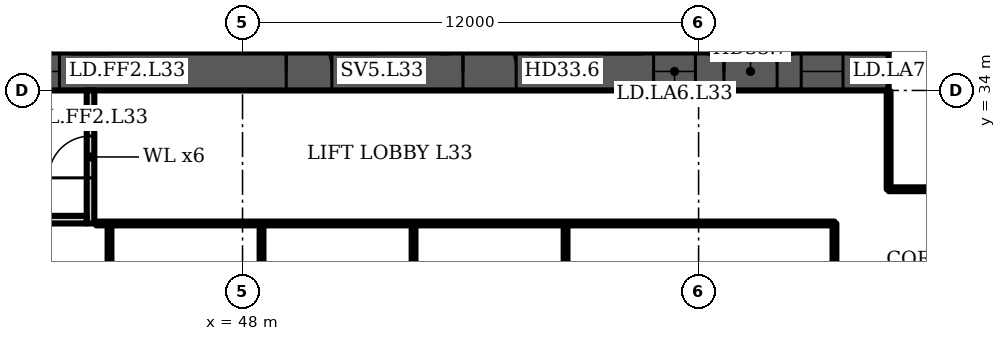
"""IFC4 building model, lengths in metres.
Left out: names, types, materials, properties, quantities, classifications, styles, units other than length and angle.
Written with IfcOpenShell. Run it as: python <this file> out.ifc"""

import sys

from ifc_helpers import new_model, si_unit, direction, frame, frame_2d, origin, place, context, subcontext, project, spatial, rectangle, extrude, element, fill, save


model = new_model("IFC4")
c1 = context("Model", 3, precision=1e-05, world=origin(), true_north=direction((0.0, 1.0)))
c2 = subcontext(c1, "Body", "Model", "MODEL_VIEW")
j1 = project(units=[si_unit("LENGTHUNIT", "METRE"), si_unit("PLANEANGLEUNIT", "RADIAN")], contexts=[c1])
p1 = place(None, origin())
s1 = spatial("IfcSite", under=j1, at=p1, CompositionType="ELEMENT")
p2 = place(p1, origin())
s2 = spatial("IfcBuilding", under=s1, at=p2, CompositionType="ELEMENT")
p3 = place(p2, frame((0.0, 0.0, 139.9)))
s3 = spatial("IfcBuildingStorey", under=s2, at=p3, CompositionType="ELEMENT", Elevation=139.9)
p4 = place(p3, frame((16.0, 34.5, 0.0), z_axis=(0.0, 0.0, 1.0), x_axis=(1.0, 0.0, 0.0)))
e1 = element("IfcWall", 1, at=p4, inside=s3, PredefinedType="SHEAR", context=c2, shape_type="SweptSolid", body=[
    extrude(rectangle(XDim=49.0, YDim=1.0, at=frame_2d((24.5, 0.0))), origin(), (0.0, 0.0, 1.0), 3.6),
])
p5 = place(p4, frame((1.2, 0.0, 0.0)))
e2 = element("IfcOpeningElement", 2, at=p5, cuts=e1, PredefinedType="OPENING", context=c2, shape_type="SweptSolid", body=[
    extrude(rectangle(XDim=1.1, YDim=2.1, at=frame_2d((0.55, 1.05))), frame((0.0, 0.51, 0.0), z_axis=(0.0, -1.0, 0.0), x_axis=(1.0, 0.0, 0.0)), (0.0, 0.0, 1.0), 1.02),
])
p6 = place(p4, frame((5.083, 0.0, 0.0)))
e3 = element("IfcOpeningElement", 3, at=p6, cuts=e1, PredefinedType="OPENING", context=c2, shape_type="SweptSolid", body=[
    extrude(rectangle(XDim=1.1, YDim=2.1, at=frame_2d((0.55, 1.05))), frame((0.0, 0.51, 0.0), z_axis=(0.0, -1.0, 0.0), x_axis=(1.0, 0.0, 0.0)), (0.0, 0.0, 1.0), 1.02),
])
p7 = place(p4, frame((2.933, 0.0, 0.0)))
e4 = element("IfcOpeningElement", 4, at=p7, cuts=e1, PredefinedType="OPENING", context=c2, shape_type="SweptSolid", body=[
    extrude(rectangle(XDim=1.4, YDim=2.1, at=frame_2d((0.7, 1.05))), frame((0.0, 0.51, 0.0), z_axis=(0.0, -1.0, 0.0), x_axis=(1.0, 0.0, 0.0)), (0.0, 0.0, 1.0), 1.02),
])
p8 = place(p4, frame((7.65, 0.0, 0.0)))
e5 = element("IfcOpeningElement", 5, at=p8, cuts=e1, PredefinedType="OPENING", context=c2, shape_type="SweptSolid", body=[
    extrude(rectangle(XDim=1.2, YDim=2.1, at=frame_2d((0.6, 1.05))), frame((0.0, 0.51, 0.0), z_axis=(0.0, -1.0, 0.0), x_axis=(1.0, 0.0, 0.0)), (0.0, 0.0, 1.0), 1.02),
])
p9 = place(p4, frame((14.817, 0.0, 0.0)))
e6 = element("IfcOpeningElement", 6, at=p9, cuts=e1, PredefinedType="OPENING", context=c2, shape_type="SweptSolid", body=[
    extrude(rectangle(XDim=1.1, YDim=2.1, at=frame_2d((0.55, 1.05))), frame((0.0, 0.51, 0.0), z_axis=(0.0, -1.0, 0.0), x_axis=(1.0, 0.0, 0.0)), (0.0, 0.0, 1.0), 1.02),
])
p10 = place(p4, frame((19.083, 0.0, 0.0)))
e7 = element("IfcOpeningElement", 7, at=p10, cuts=e1, PredefinedType="OPENING", context=c2, shape_type="SweptSolid", body=[
    extrude(rectangle(XDim=1.1, YDim=2.1, at=frame_2d((0.55, 1.05))), frame((0.0, 0.51, 0.0), z_axis=(0.0, -1.0, 0.0), x_axis=(1.0, 0.0, 0.0)), (0.0, 0.0, 1.0), 1.02),
])
p11 = place(p4, frame((16.8, 0.0, 0.0)))
e8 = element("IfcOpeningElement", 8, at=p11, cuts=e1, PredefinedType="OPENING", context=c2, shape_type="SweptSolid", body=[
    extrude(rectangle(XDim=1.4, YDim=2.1, at=frame_2d((0.7, 1.05))), frame((0.0, 0.51, 0.0), z_axis=(0.0, -1.0, 0.0), x_axis=(1.0, 0.0, 0.0)), (0.0, 0.0, 1.0), 1.02),
])
p12 = place(p4, frame((21.817, 0.0, 0.0)))
e9 = element("IfcOpeningElement", 9, at=p12, cuts=e1, PredefinedType="OPENING", context=c2, shape_type="SweptSolid", body=[
    extrude(rectangle(XDim=1.1, YDim=2.1, at=frame_2d((0.55, 1.05))), frame((0.0, 0.51, 0.0), z_axis=(0.0, -1.0, 0.0), x_axis=(1.0, 0.0, 0.0)), (0.0, 0.0, 1.0), 1.02),
])
p13 = place(p4, frame((26.083, 0.0, 0.0)))
e10 = element("IfcOpeningElement", 10, at=p13, cuts=e1, PredefinedType="OPENING", context=c2, shape_type="SweptSolid", body=[
    extrude(rectangle(XDim=1.1, YDim=2.1, at=frame_2d((0.55, 1.05))), frame((0.0, 0.51, 0.0), z_axis=(0.0, -1.0, 0.0), x_axis=(1.0, 0.0, 0.0)), (0.0, 0.0, 1.0), 1.02),
])
p14 = place(p4, frame((33.15, 0.0, 0.0)))
e11 = element("IfcOpeningElement", 11, at=p14, cuts=e1, PredefinedType="OPENING", context=c2, shape_type="SweptSolid", body=[
    extrude(rectangle(XDim=1.2, YDim=2.1, at=frame_2d((0.6, 1.05))), frame((0.0, 0.51, 0.0), z_axis=(0.0, -1.0, 0.0), x_axis=(1.0, 0.0, 0.0)), (0.0, 0.0, 1.0), 1.02),
])
p15 = place(p4, frame((37.8, 0.0, 0.0)))
e12 = element("IfcOpeningElement", 12, at=p15, cuts=e1, PredefinedType="OPENING", context=c2, shape_type="SweptSolid", body=[
    extrude(rectangle(XDim=1.4, YDim=2.1, at=frame_2d((0.7, 1.05))), frame((0.0, 0.51, 0.0), z_axis=(0.0, -1.0, 0.0), x_axis=(1.0, 0.0, 0.0)), (0.0, 0.0, 1.0), 1.02),
])
p16 = place(p4, frame((42.817, 0.0, 0.0)))
e13 = element("IfcOpeningElement", 13, at=p16, cuts=e1, PredefinedType="OPENING", context=c2, shape_type="SweptSolid", body=[
    extrude(rectangle(XDim=1.1, YDim=2.1, at=frame_2d((0.55, 1.05))), frame((0.0, 0.51, 0.0), z_axis=(0.0, -1.0, 0.0), x_axis=(1.0, 0.0, 0.0)), (0.0, 0.0, 1.0), 1.02),
])
p17 = place(p4, frame((46.7, 0.0, 0.0)))
e14 = element("IfcOpeningElement", 14, at=p17, cuts=e1, PredefinedType="OPENING", context=c2, shape_type="SweptSolid", body=[
    extrude(rectangle(XDim=1.1, YDim=2.1, at=frame_2d((0.55, 1.05))), frame((0.0, 0.51, 0.0), z_axis=(0.0, -1.0, 0.0), x_axis=(1.0, 0.0, 0.0)), (0.0, 0.0, 1.0), 1.02),
])
p18 = place(p4, frame((44.667, 0.0, 0.0)))
e15 = element("IfcOpeningElement", 15, at=p18, cuts=e1, PredefinedType="OPENING", context=c2, shape_type="SweptSolid", body=[
    extrude(rectangle(XDim=1.4, YDim=2.1, at=frame_2d((0.7, 1.05))), frame((0.0, 0.51, 0.0), z_axis=(0.0, -1.0, 0.0), x_axis=(1.0, 0.0, 0.0)), (0.0, 0.0, 1.0), 1.02),
])
p19 = place(p3, frame((44.0, 30.5, 0.0), z_axis=(0.0, 0.0, 1.0), x_axis=(0.0, 1.0, 0.0)))
e16 = element("IfcWall", 16, at=p19, inside=s3, PredefinedType="PARTITIONING", context=c2, shape_type="SweptSolid", body=[
    extrude(rectangle(XDim=3.5, YDim=0.2, at=frame_2d((1.75, 0.0))), origin(), (0.0, 0.0, 1.0), 3.2),
])
p20 = place(p19, frame((1.2, 0.0, 0.0)))
e17 = element("IfcOpeningElement", 17, at=p20, cuts=e16, PredefinedType="OPENING", context=c2, shape_type="SweptSolid", body=[
    extrude(rectangle(XDim=1.1, YDim=2.1, at=frame_2d((0.55, 1.05))), frame((0.0, 0.11, 0.0), z_axis=(0.0, -1.0, 0.0), x_axis=(1.0, 0.0, 0.0)), (0.0, 0.0, 1.0), 0.22),
])
p21 = place(p3, frame((41.1, 30.6, 0.0), z_axis=(0.0, 0.0, 1.0), x_axis=(1.0, 0.0, 0.0)))
e18 = element("IfcWall", 18, at=p21, inside=s3, PredefinedType="PARTITIONING", context=c2, shape_type="SweptSolid", body=[
    extrude(rectangle(XDim=2.8, YDim=0.2, at=frame_2d((1.4, 0.0))), origin(), (0.0, 0.0, 1.0), 3.2),
])
for number, where, z_axis, x_axis in (
    (19, (44.5, 14.53, 0.0), (0.0, 0.0, 1.0), (0.0, 1.0, 0.0)),
    (20, (48.5, 14.53, 0.0), (0.0, 0.0, 1.0), (0.0, 1.0, 0.0)),
    (21, (52.5, 14.53, 0.0), (0.0, 0.0, 1.0), (0.0, 1.0, 0.0)),
    (22, (56.5, 14.53, 0.0), (0.0, 0.0, 1.0), (0.0, 1.0, 0.0)),
    (23, (63.575, 14.53, 0.0), (0.0, 0.0, 1.0), (0.0, 1.0, 0.0)),
):
    element("IfcWall", number, at=place(p3, frame(where, z_axis=z_axis, x_axis=x_axis)), inside=s3, PredefinedType="PARTITIONING", context=c2, shape_type="SweptSolid", body=[
        extrude(rectangle(XDim=15.97, YDim=0.1, at=frame_2d((7.985, 0.0))), origin(), (0.0, 0.0, 1.0), 3.2),
    ])
p22 = place(p3, frame((65.0, 31.4, 0.0), z_axis=(0.0, 0.0, 1.0), x_axis=(0.0, 1.0, 0.0)))
e24 = element("IfcWall", 24, at=p22, inside=s3, PredefinedType="PARTITIONING", context=c2, shape_type="SweptSolid", body=[
    extrude(rectangle(XDim=2.58, YDim=0.1, at=frame_2d((1.29, 0.0))), origin(), (0.0, 0.0, 1.0), 3.2),
])
p23 = place(p3, frame((65.0, 31.4, 0.0), z_axis=(0.0, 0.0, 1.0), x_axis=(1.0, 0.0, 0.0)))
e25 = element("IfcWall", 25, at=p23, inside=s3, PredefinedType="PARTITIONING", context=c2, shape_type="SweptSolid", body=[
    extrude(rectangle(XDim=4.69, YDim=0.1, at=frame_2d((2.345, 0.0))), origin(), (0.0, 0.0, 1.0), 3.2),
])
p24 = place(p23, frame((1.14, 0.0, 0.0)))
e26 = element("IfcOpeningElement", 26, at=p24, cuts=e25, PredefinedType="OPENING", context=c2, shape_type="SweptSolid", body=[
    extrude(rectangle(XDim=1.8, YDim=2.1, at=frame_2d((0.9, 1.05))), frame((0.0, 0.06, 0.0), z_axis=(0.0, -1.0, 0.0), x_axis=(1.0, 0.0, 0.0)), (0.0, 0.0, 1.0), 0.12),
])
p25 = place(p3, frame((44.15, 30.5, 0.0), z_axis=(0.0, 0.0, 1.0), x_axis=(1.0, 0.0, 0.0)))
e27 = element("IfcWall", 27, at=p25, inside=s3, PredefinedType="PARTITIONING", context=c2, shape_type="SweptSolid", body=[
    extrude(rectangle(XDim=19.425, YDim=0.1, at=frame_2d((9.712, 0.0))), origin(), (0.0, 0.0, 1.0), 3.2),
])
p26 = place(p13, origin())
e28 = element("IfcDoor", 28, at=p26, inside=s3, OperationType="DOUBLE_DOOR_SLIDING", PredefinedType="DOOR", context=c2, shape_type="SweptSolid", body=[
    extrude(rectangle(XDim=1.1, YDim=2.1, at=frame_2d((0.55, 1.05))), frame((0.0, 0.025, 0.0), z_axis=(0.0, -1.0, 0.0), x_axis=(1.0, 0.0, 0.0)), (0.0, 0.0, 1.0), 0.05),
])
fill(e10, e28)
p27 = place(p14, origin())
e29 = element("IfcDoor", 29, at=p27, inside=s3, OperationType="SINGLE_SWING_LEFT", PredefinedType="DOOR", context=c2, shape_type="SweptSolid", body=[
    extrude(rectangle(XDim=1.2, YDim=2.1, at=frame_2d((0.6, 1.05))), frame((0.0, 0.025, 0.0), z_axis=(0.0, -1.0, 0.0), x_axis=(1.0, 0.0, 0.0)), (0.0, 0.0, 1.0), 0.05),
])
fill(e11, e29)
p28 = place(p15, origin())
e30 = element("IfcDoor", 30, at=p28, inside=s3, OperationType="DOUBLE_DOOR_SINGLE_SWING", PredefinedType="DOOR", context=c2, shape_type="SweptSolid", body=[
    extrude(rectangle(XDim=1.4, YDim=2.1, at=frame_2d((0.7, 1.05))), frame((0.0, 0.025, 0.0), z_axis=(0.0, -1.0, 0.0), x_axis=(1.0, 0.0, 0.0)), (0.0, 0.0, 1.0), 0.05),
])
fill(e12, e30)
p29 = place(p16, origin())
e31 = element("IfcDoor", 31, at=p29, inside=s3, OperationType="DOUBLE_DOOR_SLIDING", PredefinedType="DOOR", context=c2, shape_type="SweptSolid", body=[
    extrude(rectangle(XDim=1.1, YDim=2.1, at=frame_2d((0.55, 1.05))), frame((0.0, 0.025, 0.0), z_axis=(0.0, -1.0, 0.0), x_axis=(1.0, 0.0, 0.0)), (0.0, 0.0, 1.0), 0.05),
])
fill(e13, e31)
p30 = place(p17, origin())
e32 = element("IfcDoor", 32, at=p30, inside=s3, OperationType="DOUBLE_DOOR_SLIDING", PredefinedType="DOOR", context=c2, shape_type="SweptSolid", body=[
    extrude(rectangle(XDim=1.1, YDim=2.1, at=frame_2d((0.55, 1.05))), frame((0.0, 0.025, 0.0), z_axis=(0.0, -1.0, 0.0), x_axis=(1.0, 0.0, 0.0)), (0.0, 0.0, 1.0), 0.05),
])
fill(e14, e32)
p31 = place(p18, origin())
e33 = element("IfcDoor", 33, at=p31, inside=s3, OperationType="DOUBLE_DOOR_SINGLE_SWING", PredefinedType="DOOR", context=c2, shape_type="SweptSolid", body=[
    extrude(rectangle(XDim=1.4, YDim=2.1, at=frame_2d((0.7, 1.05))), frame((0.0, 0.025, 0.0), z_axis=(0.0, -1.0, 0.0), x_axis=(1.0, 0.0, 0.0)), (0.0, 0.0, 1.0), 0.05),
])
fill(e15, e33)
p32 = place(p20, origin())
e34 = element("IfcDoor", 34, at=p32, inside=s3, OperationType="SINGLE_SWING_LEFT", PredefinedType="DOOR", context=c2, shape_type="SweptSolid", body=[
    extrude(rectangle(XDim=1.1, YDim=2.1, at=frame_2d((0.55, 1.05))), frame((0.0, 0.025, 0.0), z_axis=(0.0, -1.0, 0.0), x_axis=(1.0, 0.0, 0.0)), (0.0, 0.0, 1.0), 0.05),
])
fill(e17, e34)
save(model, sys.argv[1])
